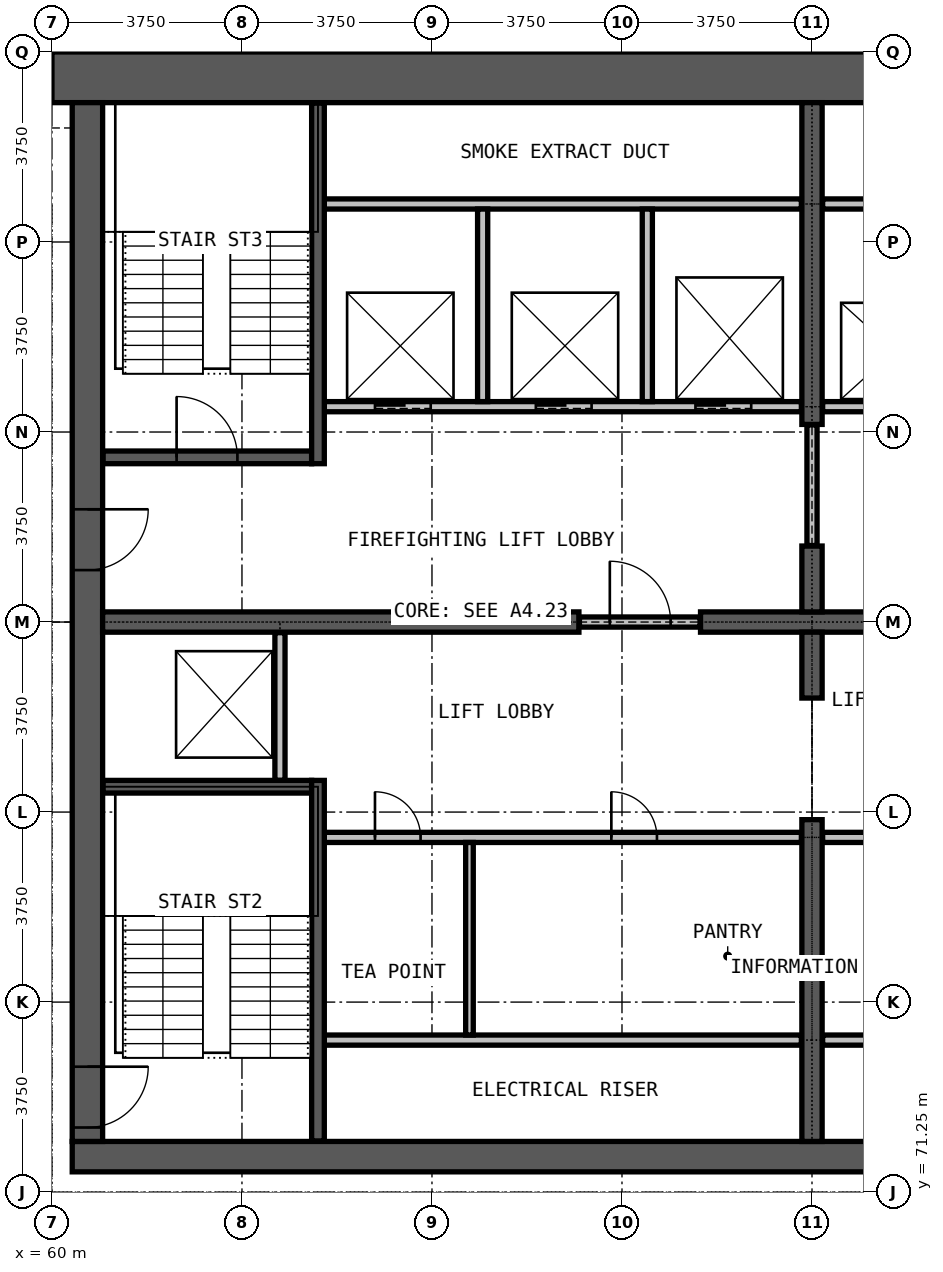
"""IFC4 building model, lengths in metres.
Left out: names, types, materials, properties, quantities, classifications, styles, units other than length and angle.
Written with IfcOpenShell. Run it as: python <this file> out.ifc"""

import sys

from ifc_helpers import new_model, si_unit, direction, frame, frame_2d, origin, place, context, subcontext, project, spatial, rectangle, extrude, element, fill, save


model = new_model("IFC4")
c1 = context("Model", 3, precision=1e-05, world=origin(), true_north=direction((0.0, 1.0)))
c2 = subcontext(c1, "Body", "Model", "MODEL_VIEW")
j1 = project(units=[si_unit("LENGTHUNIT", "METRE"), si_unit("PLANEANGLEUNIT", "RADIAN")], contexts=[c1])
p1 = place(None, origin())
s1 = spatial("IfcSite", under=j1, at=p1, CompositionType="ELEMENT")
p2 = place(p1, origin())
s2 = spatial("IfcBuilding", under=s1, at=p2, CompositionType="ELEMENT")
p3 = place(p2, frame((0.0, 0.0, 249.9)))
s3 = spatial("IfcBuildingStorey", under=s2, at=p3, CompositionType="ELEMENT", Elevation=249.9)
p4 = place(p3, frame((60.4, 71.95, 0.0), z_axis=(0.0, 0.0, 1.0), x_axis=(1.0, 0.0, 0.0)))
e1 = element("IfcWall", 1, at=p4, inside=s3, PredefinedType="SHEAR", context=c2, shape_type="SweptSolid", body=[
    extrude(rectangle(XDim=29.2, YDim=0.6, at=frame_2d((14.6, 0.0))), origin(), (0.0, 0.0, 1.0), 3.6),
])
p5 = place(p3, frame((90.0, 93.25, 0.0), z_axis=(0.0, 0.0, 1.0), x_axis=(-1.0, 0.0, 0.0)))
e2 = element("IfcWall", 2, at=p5, inside=s3, PredefinedType="SHEAR", context=c2, shape_type="SweptSolid", body=[
    extrude(rectangle(XDim=30.0, YDim=1.0, at=frame_2d((15.0, 0.0))), origin(), (0.0, 0.0, 1.0), 3.6),
])
p6 = place(p3, frame((60.7, 92.75, 0.0), z_axis=(0.0, 0.0, 1.0), x_axis=(0.0, -1.0, 0.0)))
e3 = element("IfcWall", 3, at=p6, inside=s3, PredefinedType="SHEAR", context=c2, shape_type="SweptSolid", body=[
    extrude(rectangle(XDim=20.5, YDim=0.6, at=frame_2d((10.25, 0.0))), origin(), (0.0, 0.0, 1.0), 3.6),
])
p7 = place(p6, frame((19.025, 0.0, 0.0)))
e4 = element("IfcOpeningElement", 4, at=p7, cuts=e3, PredefinedType="OPENING", context=c2, shape_type="SweptSolid", body=[
    extrude(rectangle(XDim=1.2, YDim=2.2, at=frame_2d((0.6, 1.1))), frame((0.0, 0.31, 0.0), z_axis=(0.0, -1.0, 0.0), x_axis=(1.0, 0.0, 0.0)), (0.0, 0.0, 1.0), 0.62),
])
p8 = place(p6, frame((8.025, 0.0, 0.0)))
e5 = element("IfcOpeningElement", 5, at=p8, cuts=e3, PredefinedType="OPENING", context=c2, shape_type="SweptSolid", body=[
    extrude(rectangle(XDim=1.2, YDim=2.2, at=frame_2d((0.6, 1.1))), frame((0.0, 0.31, 0.0), z_axis=(0.0, -1.0, 0.0), x_axis=(1.0, 0.0, 0.0)), (0.0, 0.0, 1.0), 0.62),
])
p9 = place(p3, frame((61.0, 82.5, 0.0), z_axis=(0.0, 0.0, 1.0), x_axis=(1.0, 0.0, 0.0)))
e6 = element("IfcWall", 6, at=p9, inside=s3, PredefinedType="SHEAR", context=c2, shape_type="SweptSolid", body=[
    extrude(rectangle(XDim=9.4, YDim=0.4, at=frame_2d((4.7, 0.0))), origin(), (0.0, 0.0, 1.0), 3.6),
])
p10 = place(p3, frame((72.8, 82.5, 0.0), z_axis=(0.0, 0.0, 1.0), x_axis=(1.0, 0.0, 0.0)))
e7 = element("IfcWall", 7, at=p10, inside=s3, PredefinedType="SHEAR", context=c2, shape_type="SweptSolid", body=[
    extrude(rectangle(XDim=4.4, YDim=0.4, at=frame_2d((2.2, 0.0))), origin(), (0.0, 0.0, 1.0), 3.6),
])
p11 = place(p3, frame((75.0, 72.25, 0.0), z_axis=(0.0, 0.0, 1.0), x_axis=(0.0, 1.0, 0.0)))
e8 = element("IfcWall", 8, at=p11, inside=s3, PredefinedType="SHEAR", context=c2, shape_type="SweptSolid", body=[
    extrude(rectangle(XDim=6.35, YDim=0.4, at=frame_2d((3.175, 0.0))), origin(), (0.0, 0.0, 1.0), 3.6),
])
for number, where, z_axis, x_axis in (
    (9, (75.0, 81.0, 0.0), (0.0, 0.0, 1.0), (0.0, 1.0, 0.0)),
    (10, (75.0, 82.7, 0.0), (0.0, 0.0, 1.0), (0.0, 1.0, 0.0)),
):
    element("IfcWall", number, at=place(p3, frame(where, z_axis=z_axis, x_axis=x_axis)), inside=s3, PredefinedType="SHEAR", context=c2, shape_type="SweptSolid", body=[
        extrude(rectangle(XDim=1.3, YDim=0.4, at=frame_2d((0.65, 0.0))), origin(), (0.0, 0.0, 1.0), 3.6),
    ])
p12 = place(p3, frame((75.0, 86.4, 0.0), z_axis=(0.0, 0.0, 1.0), x_axis=(0.0, 1.0, 0.0)))
e11 = element("IfcWall", 11, at=p12, inside=s3, PredefinedType="SHEAR", context=c2, shape_type="SweptSolid", body=[
    extrude(rectangle(XDim=6.35, YDim=0.4, at=frame_2d((3.175, 0.0))), origin(), (0.0, 0.0, 1.0), 3.6),
])
for number, where, z_axis, x_axis in (
    (12, (65.375, 74.25, 0.0), (0.0, 0.0, 1.0), (1.0, 0.0, 0.0)),
    (13, (75.21, 74.25, 0.0), (0.0, 0.0, 1.0), (1.0, 0.0, 0.0)),
):
    element("IfcWall", number, at=place(p3, frame(where, z_axis=z_axis, x_axis=x_axis)), inside=s3, PredefinedType="PARTITIONING", context=c2, shape_type="SweptSolid", body=[
        extrude(rectangle(XDim=9.415, YDim=0.2, at=frame_2d((4.708, 0.0))), origin(), (0.0, 0.0, 1.0), 3.25),
    ])
p13 = place(p3, frame((65.375, 78.25, 0.0), z_axis=(0.0, 0.0, 1.0), x_axis=(1.0, 0.0, 0.0)))
e14 = element("IfcWall", 14, at=p13, inside=s3, PredefinedType="PARTITIONING", context=c2, shape_type="SweptSolid", body=[
    extrude(rectangle(XDim=9.415, YDim=0.2, at=frame_2d((4.708, 0.0))), origin(), (0.0, 0.0, 1.0), 3.25),
])
p14 = place(p13, frame((1.0, 0.0, 0.0)))
e15 = element("IfcOpeningElement", 15, at=p14, cuts=e14, PredefinedType="OPENING", context=c2, shape_type="SweptSolid", body=[
    extrude(rectangle(XDim=0.9, YDim=2.2, at=frame_2d((0.45, 1.1))), frame((0.0, 0.11, 0.0), z_axis=(0.0, -1.0, 0.0), x_axis=(1.0, 0.0, 0.0)), (0.0, 0.0, 1.0), 0.22),
])
p15 = place(p13, frame((5.665, 0.0, 0.0)))
e16 = element("IfcOpeningElement", 16, at=p15, cuts=e14, PredefinedType="OPENING", context=c2, shape_type="SweptSolid", body=[
    extrude(rectangle(XDim=0.9, YDim=2.2, at=frame_2d((0.45, 1.1))), frame((0.0, 0.11, 0.0), z_axis=(0.0, -1.0, 0.0), x_axis=(1.0, 0.0, 0.0)), (0.0, 0.0, 1.0), 0.22),
])
p16 = place(p3, frame((75.21, 78.25, 0.0), z_axis=(0.0, 0.0, 1.0), x_axis=(1.0, 0.0, 0.0)))
e17 = element("IfcWall", 17, at=p16, inside=s3, PredefinedType="PARTITIONING", context=c2, shape_type="SweptSolid", body=[
    extrude(rectangle(XDim=9.415, YDim=0.2, at=frame_2d((4.708, 0.0))), origin(), (0.0, 0.0, 1.0), 3.25),
])
p17 = place(p16, frame((1.9, 0.0, 0.0)))
e18 = element("IfcOpeningElement", 18, at=p17, cuts=e17, PredefinedType="OPENING", context=c2, shape_type="SweptSolid", body=[
    extrude(rectangle(XDim=0.9, YDim=2.2, at=frame_2d((0.45, 1.1))), frame((0.0, 0.11, 0.0), z_axis=(0.0, -1.0, 0.0), x_axis=(1.0, 0.0, 0.0)), (0.0, 0.0, 1.0), 0.22),
])
p18 = place(p16, frame((6.565, 0.0, 0.0)))
e19 = element("IfcOpeningElement", 19, at=p18, cuts=e17, PredefinedType="OPENING", context=c2, shape_type="SweptSolid", body=[
    extrude(rectangle(XDim=0.9, YDim=2.2, at=frame_2d((0.45, 1.1))), frame((0.0, 0.11, 0.0), z_axis=(0.0, -1.0, 0.0), x_axis=(1.0, 0.0, 0.0)), (0.0, 0.0, 1.0), 0.22),
])
p19 = place(p3, frame((70.41, 82.5, 0.0), z_axis=(0.0, 0.0, 1.0), x_axis=(1.0, 0.0, 0.0)))
e20 = element("IfcWall", 20, at=p19, inside=s3, PredefinedType="PARTITIONING", context=c2, shape_type="SweptSolid", body=[
    extrude(rectangle(XDim=2.38, YDim=0.2, at=frame_2d((1.19, 0.0))), origin(), (0.0, 0.0, 1.0), 2.4),
])
p20 = place(p19, frame((0.6, 0.0, 0.0)))
e21 = element("IfcOpeningElement", 21, at=p20, cuts=e20, PredefinedType="OPENING", context=c2, shape_type="SweptSolid", body=[
    extrude(rectangle(XDim=1.2, YDim=2.2, at=frame_2d((0.6, 1.1))), frame((0.0, 0.11, 0.0), z_axis=(0.0, -1.0, 0.0), x_axis=(1.0, 0.0, 0.0)), (0.0, 0.0, 1.0), 0.22),
])
p21 = place(p3, frame((75.0, 84.01, 0.0), z_axis=(0.0, 0.0, 1.0), x_axis=(0.0, 1.0, 0.0)))
e22 = element("IfcWall", 22, at=p21, inside=s3, PredefinedType="PARTITIONING", context=c2, shape_type="SweptSolid", body=[
    extrude(rectangle(XDim=2.38, YDim=0.2, at=frame_2d((1.19, 0.0))), origin(), (0.0, 0.0, 1.0), 2.4),
])
p22 = place(p3, frame((68.24, 74.35, 0.0), z_axis=(0.0, 0.0, 1.0), x_axis=(0.0, 1.0, 0.0)))
e23 = element("IfcWall", 23, at=p22, inside=s3, PredefinedType="PARTITIONING", context=c2, shape_type="SweptSolid", body=[
    extrude(rectangle(XDim=3.8, YDim=0.15, at=frame_2d((1.9, 0.0))), origin(), (0.0, 0.0, 1.0), 3.25),
])
p23 = place(p3, frame((65.375, 86.75, 0.0), z_axis=(0.0, 0.0, 1.0), x_axis=(1.0, 0.0, 0.0)))
e24 = element("IfcWall", 24, at=p23, inside=s3, PredefinedType="PARTITIONING", context=c2, shape_type="SweptSolid", body=[
    extrude(rectangle(XDim=9.415, YDim=0.2, at=frame_2d((4.708, 0.0))), origin(), (0.0, 0.0, 1.0), 3.25),
])
p24 = place(p23, frame((1.0, 0.0, 0.0)))
e25 = element("IfcOpeningElement", 25, at=p24, cuts=e24, PredefinedType="OPENING", context=c2, shape_type="SweptSolid", body=[
    extrude(rectangle(XDim=1.1, YDim=2.2, at=frame_2d((0.55, 1.1))), frame((0.0, 0.11, 0.0), z_axis=(0.0, -1.0, 0.0), x_axis=(1.0, 0.0, 0.0)), (0.0, 0.0, 1.0), 0.22),
])
p25 = place(p23, frame((4.175, 0.0, 0.0)))
e26 = element("IfcOpeningElement", 26, at=p25, cuts=e24, PredefinedType="OPENING", context=c2, shape_type="SweptSolid", body=[
    extrude(rectangle(XDim=1.1, YDim=2.2, at=frame_2d((0.55, 1.1))), frame((0.0, 0.11, 0.0), z_axis=(0.0, -1.0, 0.0), x_axis=(1.0, 0.0, 0.0)), (0.0, 0.0, 1.0), 0.22),
])
p26 = place(p23, frame((7.325, 0.0, 0.0)))
e27 = element("IfcOpeningElement", 27, at=p26, cuts=e24, PredefinedType="OPENING", context=c2, shape_type="SweptSolid", body=[
    extrude(rectangle(XDim=1.1, YDim=2.2, at=frame_2d((0.55, 1.1))), frame((0.0, 0.11, 0.0), z_axis=(0.0, -1.0, 0.0), x_axis=(1.0, 0.0, 0.0)), (0.0, 0.0, 1.0), 0.22),
])
p27 = place(p3, frame((75.21, 86.75, 0.0), z_axis=(0.0, 0.0, 1.0), x_axis=(1.0, 0.0, 0.0)))
e28 = element("IfcWall", 28, at=p27, inside=s3, PredefinedType="PARTITIONING", context=c2, shape_type="SweptSolid", body=[
    extrude(rectangle(XDim=9.415, YDim=0.2, at=frame_2d((4.708, 0.0))), origin(), (0.0, 0.0, 1.0), 3.25),
])
p28 = place(p27, frame((0.95, 0.0, 0.0)))
e29 = element("IfcOpeningElement", 29, at=p28, cuts=e28, PredefinedType="OPENING", context=c2, shape_type="SweptSolid", body=[
    extrude(rectangle(XDim=1.1, YDim=2.2, at=frame_2d((0.55, 1.1))), frame((0.0, 0.11, 0.0), z_axis=(0.0, -1.0, 0.0), x_axis=(1.0, 0.0, 0.0)), (0.0, 0.0, 1.0), 0.22),
])
p29 = place(p27, frame((4.14, 0.0, 0.0)))
e30 = element("IfcOpeningElement", 30, at=p29, cuts=e28, PredefinedType="OPENING", context=c2, shape_type="SweptSolid", body=[
    extrude(rectangle(XDim=1.1, YDim=2.2, at=frame_2d((0.55, 1.1))), frame((0.0, 0.11, 0.0), z_axis=(0.0, -1.0, 0.0), x_axis=(1.0, 0.0, 0.0)), (0.0, 0.0, 1.0), 0.22),
])
p30 = place(p27, frame((7.29, 0.0, 0.0)))
e31 = element("IfcOpeningElement", 31, at=p30, cuts=e28, PredefinedType="OPENING", context=c2, shape_type="SweptSolid", body=[
    extrude(rectangle(XDim=1.1, YDim=2.2, at=frame_2d((0.55, 1.1))), frame((0.0, 0.11, 0.0), z_axis=(0.0, -1.0, 0.0), x_axis=(1.0, 0.0, 0.0)), (0.0, 0.0, 1.0), 0.22),
])
for number, where, z_axis, x_axis in (
    (32, (65.375, 90.75, 0.0), (0.0, 0.0, 1.0), (1.0, 0.0, 0.0)),
    (33, (75.21, 90.75, 0.0), (0.0, 0.0, 1.0), (1.0, 0.0, 0.0)),
):
    element("IfcWall", number, at=place(p3, frame(where, z_axis=z_axis, x_axis=x_axis)), inside=s3, PredefinedType="PARTITIONING", context=c2, shape_type="SweptSolid", body=[
        extrude(rectangle(XDim=9.415, YDim=0.2, at=frame_2d((4.708, 0.0))), origin(), (0.0, 0.0, 1.0), 3.25),
    ])
p31 = place(p3, frame((64.5, 79.375, 0.0), z_axis=(0.0, 0.0, 1.0), x_axis=(0.0, 1.0, 0.0)))
e34 = element("IfcWall", 34, at=p31, inside=s3, PredefinedType="PARTITIONING", context=c2, shape_type="SweptSolid", body=[
    extrude(rectangle(XDim=2.915, YDim=0.2, at=frame_2d((1.458, 0.0))), origin(), (0.0, 0.0, 1.0), 3.25),
])
for number, where, z_axis, x_axis in (
    (35, (68.5, 86.85, 0.0), (0.0, 0.0, 1.0), (0.0, 1.0, 0.0)),
    (36, (71.75, 86.85, 0.0), (0.0, 0.0, 1.0), (0.0, 1.0, 0.0)),
):
    element("IfcWall", number, at=place(p3, frame(where, z_axis=z_axis, x_axis=x_axis)), inside=s3, PredefinedType="PARTITIONING", context=c2, shape_type="SweptSolid", body=[
        extrude(rectangle(XDim=3.8, YDim=0.2, at=frame_2d((1.9, 0.0))), origin(), (0.0, 0.0, 1.0), 3.25),
    ])
p32 = place(p3, frame((61.01, 79.25, 0.0), z_axis=(0.0, 0.0, 1.0), x_axis=(1.0, 0.0, 0.0)))
e37 = element("IfcWall", 37, at=p32, inside=s3, PredefinedType="PARTITIONING", context=c2, shape_type="SweptSolid", body=[
    extrude(rectangle(XDim=4.115, YDim=0.25, at=frame_2d((2.058, 0.0))), origin(), (0.0, 0.0, 1.0), 3.25),
])
p33 = place(p3, frame((61.01, 85.75, 0.0), z_axis=(0.0, 0.0, 1.0), x_axis=(1.0, 0.0, 0.0)))
e38 = element("IfcWall", 38, at=p33, inside=s3, PredefinedType="PARTITIONING", context=c2, shape_type="SweptSolid", body=[
    extrude(rectangle(XDim=4.115, YDim=0.25, at=frame_2d((2.058, 0.0))), origin(), (0.0, 0.0, 1.0), 3.25),
])
p34 = place(p33, frame((1.45, 0.0, 0.0)))
e39 = element("IfcOpeningElement", 39, at=p34, cuts=e38, PredefinedType="OPENING", context=c2, shape_type="SweptSolid", body=[
    extrude(rectangle(XDim=1.2, YDim=2.2, at=frame_2d((0.6, 1.1))), frame((0.0, 0.135, 0.0), z_axis=(0.0, -1.0, 0.0), x_axis=(1.0, 0.0, 0.0)), (0.0, 0.0, 1.0), 0.27),
])
for number, where, z_axis, x_axis in (
    (40, (65.25, 72.26, 0.0), (0.0, 0.0, 1.0), (0.0, 1.0, 0.0)),
    (41, (65.25, 85.625, 0.0), (0.0, 0.0, 1.0), (0.0, 1.0, 0.0)),
):
    element("IfcWall", number, at=place(p3, frame(where, z_axis=z_axis, x_axis=x_axis)), inside=s3, PredefinedType="PARTITIONING", context=c2, shape_type="SweptSolid", body=[
        extrude(rectangle(XDim=7.115, YDim=0.25, at=frame_2d((3.558, 0.0))), origin(), (0.0, 0.0, 1.0), 3.25),
    ])
p35 = place(p24, origin())
e42 = element("IfcDoor", 42, at=p35, inside=s3, OperationType="DOUBLE_DOOR_SLIDING", PredefinedType="DOOR", context=c2, shape_type="SweptSolid", body=[
    extrude(rectangle(XDim=1.1, YDim=2.2, at=frame_2d((0.55, 1.1))), frame((0.0, 0.025, 0.0), z_axis=(0.0, -1.0, 0.0), x_axis=(1.0, 0.0, 0.0)), (0.0, 0.0, 1.0), 0.05),
])
fill(e25, e42)
p36 = place(p25, origin())
e43 = element("IfcDoor", 43, at=p36, inside=s3, OperationType="DOUBLE_DOOR_SLIDING", PredefinedType="DOOR", context=c2, shape_type="SweptSolid", body=[
    extrude(rectangle(XDim=1.1, YDim=2.2, at=frame_2d((0.55, 1.1))), frame((0.0, 0.025, 0.0), z_axis=(0.0, -1.0, 0.0), x_axis=(1.0, 0.0, 0.0)), (0.0, 0.0, 1.0), 0.05),
])
fill(e26, e43)
p37 = place(p26, origin())
e44 = element("IfcDoor", 44, at=p37, inside=s3, OperationType="DOUBLE_DOOR_SLIDING", PredefinedType="DOOR", context=c2, shape_type="SweptSolid", body=[
    extrude(rectangle(XDim=1.1, YDim=2.2, at=frame_2d((0.55, 1.1))), frame((0.0, 0.025, 0.0), z_axis=(0.0, -1.0, 0.0), x_axis=(1.0, 0.0, 0.0)), (0.0, 0.0, 1.0), 0.05),
])
fill(e27, e44)
p38 = place(p20, origin())
e45 = element("IfcDoor", 45, at=p38, inside=s3, OperationType="SINGLE_SWING_LEFT", PredefinedType="DOOR", context=c2, shape_type="SweptSolid", body=[
    extrude(rectangle(XDim=1.2, YDim=2.2, at=frame_2d((0.6, 1.1))), frame((0.0, 0.025, 0.0), z_axis=(0.0, -1.0, 0.0), x_axis=(1.0, 0.0, 0.0)), (0.0, 0.0, 1.0), 0.05),
])
fill(e21, e45)
p39 = place(p34, origin())
e46 = element("IfcDoor", 46, at=p39, inside=s3, OperationType="SINGLE_SWING_LEFT", PredefinedType="DOOR", context=c2, shape_type="SweptSolid", body=[
    extrude(rectangle(XDim=1.2, YDim=2.2, at=frame_2d((0.6, 1.1))), frame((0.0, 0.025, 0.0), z_axis=(0.0, -1.0, 0.0), x_axis=(1.0, 0.0, 0.0)), (0.0, 0.0, 1.0), 0.05),
])
fill(e39, e46)
p40 = place(p7, origin())
e47 = element("IfcDoor", 47, at=p40, inside=s3, OperationType="SINGLE_SWING_LEFT", PredefinedType="DOOR", context=c2, shape_type="SweptSolid", body=[
    extrude(rectangle(XDim=1.2, YDim=2.2, at=frame_2d((0.6, 1.1))), frame((0.0, 0.025, 0.0), z_axis=(0.0, -1.0, 0.0), x_axis=(1.0, 0.0, 0.0)), (0.0, 0.0, 1.0), 0.05),
])
fill(e4, e47)
p41 = place(p8, origin())
e48 = element("IfcDoor", 48, at=p41, inside=s3, OperationType="SINGLE_SWING_LEFT", PredefinedType="DOOR", context=c2, shape_type="SweptSolid", body=[
    extrude(rectangle(XDim=1.2, YDim=2.2, at=frame_2d((0.6, 1.1))), frame((0.0, 0.025, 0.0), z_axis=(0.0, -1.0, 0.0), x_axis=(1.0, 0.0, 0.0)), (0.0, 0.0, 1.0), 0.05),
])
fill(e5, e48)
p42 = place(p14, origin())
e49 = element("IfcDoor", 49, at=p42, inside=s3, OperationType="SINGLE_SWING_RIGHT", PredefinedType="DOOR", context=c2, shape_type="SweptSolid", body=[
    extrude(rectangle(XDim=0.9, YDim=2.2, at=frame_2d((0.45, 1.1))), frame((0.0, 0.025, 0.0), z_axis=(0.0, -1.0, 0.0), x_axis=(1.0, 0.0, 0.0)), (0.0, 0.0, 1.0), 0.05),
])
fill(e15, e49)
p43 = place(p15, origin())
e50 = element("IfcDoor", 50, at=p43, inside=s3, OperationType="SINGLE_SWING_RIGHT", PredefinedType="DOOR", context=c2, shape_type="SweptSolid", body=[
    extrude(rectangle(XDim=0.9, YDim=2.2, at=frame_2d((0.45, 1.1))), frame((0.0, 0.025, 0.0), z_axis=(0.0, -1.0, 0.0), x_axis=(1.0, 0.0, 0.0)), (0.0, 0.0, 1.0), 0.05),
])
fill(e16, e50)
save(model, sys.argv[1])
